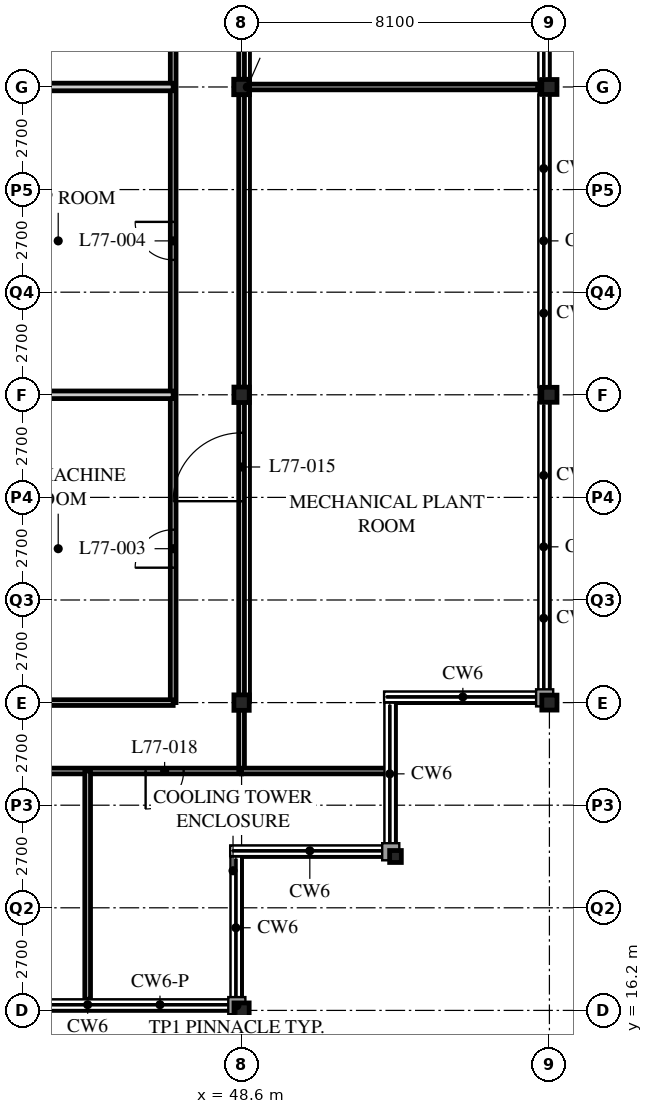
"""IFC4 building model, lengths in metres.
Left out: names, types, materials, properties, quantities, classifications, styles, units other than length and angle.
Written with IfcOpenShell. Run it as: python <this file> out.ifc"""

import sys

from ifc_helpers import new_model, si_unit, direction, frame, frame_2d, origin, origin_2d, place, context, subcontext, project, spatial, rectangle, hollow_rectangle, i_section, extrude, element, fill, save


model = new_model("IFC4")
c1 = context("Model", 3, precision=1e-05, world=origin(), true_north=direction((0.0, 1.0)))
c2 = subcontext(c1, "Body", "Model", "MODEL_VIEW")
j1 = project(units=[si_unit("LENGTHUNIT", "METRE"), si_unit("PLANEANGLEUNIT", "RADIAN")], contexts=[c1])
p1 = place(None, origin())
s1 = spatial("IfcSite", under=j1, at=p1, CompositionType="ELEMENT")
p2 = place(p1, origin())
s2 = spatial("IfcBuilding", under=s1, at=p2, CompositionType="ELEMENT")
p3 = place(p2, frame((0.0, 0.0, 303.9)))
s3 = spatial("IfcBuildingStorey", under=s2, at=p3, CompositionType="ELEMENT", Elevation=303.9)
p4 = place(p3, frame((48.6, 16.2, 0.0), z_axis=(0.0, 0.0, 1.0), x_axis=(1.0, 0.0, 0.0)))
e1 = element("IfcColumn", 1, at=p4, inside=s3, PredefinedType="COLUMN", context=c2, shape_type="SweptSolid", body=[
    extrude(i_section(OverallWidth=0.399, OverallDepth=0.394, WebThickness=0.023, FlangeThickness=0.037, FilletRadius=0.015, at=origin_2d()), origin(), (0.0, 0.0, 1.0), 6.0),
])
for number, where, z_axis, x_axis in (
    (2, (48.6, 24.3, 0.0), (0.0, 0.0, 1.0), (1.0, 0.0, 0.0)),
    (3, (48.6, 32.4, 0.0), (0.0, 0.0, 1.0), (1.0, 0.0, 0.0)),
    (4, (48.6, 40.5, 0.0), (0.0, 0.0, 1.0), (1.0, 0.0, 0.0)),
):
    element("IfcColumn", number, at=place(p3, frame(where, z_axis=z_axis, x_axis=x_axis)), inside=s3, PredefinedType="COLUMN", context=c2, shape_type="SweptSolid", body=[
        extrude(i_section(OverallWidth=0.403, OverallDepth=0.406, WebThickness=0.027, FlangeThickness=0.043, FilletRadius=0.015, at=origin_2d()), origin(), (0.0, 0.0, 1.0), 6.0),
    ])
p5 = place(p3, frame((52.65, 20.25, 0.0), z_axis=(0.0, 0.0, 1.0), x_axis=(1.0, 0.0, 0.0)))
e5 = element("IfcColumn", 5, at=p5, inside=s3, PredefinedType="COLUMN", context=c2, shape_type="SweptSolid", body=[
    extrude(i_section(OverallWidth=0.307, OverallDepth=0.314, WebThickness=0.012, FlangeThickness=0.019, FilletRadius=0.015, at=origin_2d()), origin(), (0.0, 0.0, 1.0), 6.0),
])
for number, where, z_axis, x_axis in (
    (6, (56.7, 24.3, 0.0), (0.0, 0.0, 1.0), (1.0, 0.0, 0.0)),
    (7, (56.7, 32.4, 0.0), (0.0, 0.0, 1.0), (1.0, 0.0, 0.0)),
    (8, (56.7, 40.5, 0.0), (0.0, 0.0, 1.0), (1.0, 0.0, 0.0)),
):
    element("IfcColumn", number, at=place(p3, frame(where, z_axis=z_axis, x_axis=x_axis)), inside=s3, PredefinedType="COLUMN", context=c2, shape_type="SweptSolid", body=[
        extrude(i_section(OverallWidth=0.399, OverallDepth=0.394, WebThickness=0.023, FlangeThickness=0.037, FilletRadius=0.015, at=origin_2d()), origin(), (0.0, 0.0, 1.0), 6.0),
    ])
p6 = place(p3, frame((8.35, 16.325, 6.0), z_axis=(0.0, 0.0, 1.0), x_axis=(1.0, 0.0, 0.0)))
e9 = element("IfcWall", 9, at=p6, inside=s3, PredefinedType="PARAPET", context=c2, shape_type="SweptSolid", body=[
    extrude(rectangle(XDim=40.25, YDim=0.25, at=frame_2d((20.125, 0.0))), origin(), (0.0, 0.0, 1.0), 1.285),
])
p7 = place(p3, frame((48.475, 16.45, 6.0), z_axis=(0.0, 0.0, 1.0), x_axis=(0.0, 1.0, 0.0)))
e10 = element("IfcWall", 10, at=p7, inside=s3, PredefinedType="PARAPET", context=c2, shape_type="SweptSolid", body=[
    extrude(rectangle(XDim=3.8, YDim=0.25, at=frame_2d((1.9, 0.0))), origin(), (0.0, 0.0, 1.0), 1.285),
])
p8 = place(p3, frame((48.35, 20.375, 6.0), z_axis=(0.0, 0.0, 1.0), x_axis=(1.0, 0.0, 0.0)))
e11 = element("IfcWall", 11, at=p8, inside=s3, PredefinedType="PARAPET", context=c2, shape_type="SweptSolid", body=[
    extrude(rectangle(XDim=4.3, YDim=0.25, at=frame_2d((2.15, 0.0))), origin(), (0.0, 0.0, 1.0), 1.285),
])
p9 = place(p3, frame((52.525, 20.5, 6.0), z_axis=(0.0, 0.0, 1.0), x_axis=(0.0, 1.0, 0.0)))
e12 = element("IfcWall", 12, at=p9, inside=s3, PredefinedType="PARAPET", context=c2, shape_type="SweptSolid", body=[
    extrude(rectangle(XDim=3.8, YDim=0.25, at=frame_2d((1.9, 0.0))), origin(), (0.0, 0.0, 1.0), 1.285),
])
p10 = place(p3, frame((52.4, 24.425, 6.0), z_axis=(0.0, 0.0, 1.0), x_axis=(1.0, 0.0, 0.0)))
e13 = element("IfcWall", 13, at=p10, inside=s3, PredefinedType="PARAPET", context=c2, shape_type="SweptSolid", body=[
    extrude(rectangle(XDim=4.3, YDim=0.25, at=frame_2d((2.15, 0.0))), origin(), (0.0, 0.0, 1.0), 1.285),
])
p11 = place(p3, frame((56.575, 24.55, 6.0), z_axis=(0.0, 0.0, 1.0), x_axis=(0.0, 1.0, 0.0)))
e14 = element("IfcWall", 14, at=p11, inside=s3, PredefinedType="PARAPET", context=c2, shape_type="SweptSolid", body=[
    extrude(rectangle(XDim=32.15, YDim=0.25, at=frame_2d((16.075, 0.0))), origin(), (0.0, 0.0, 1.0), 1.285),
])
p12 = place(p3, frame((48.6, 40.5, 6.0), z_axis=(0.0, 0.0, 1.0), x_axis=(1.0, 0.0, 0.0)))
e15 = element("IfcColumn", 15, at=p12, inside=s3, PredefinedType="COLUMN", context=c2, shape_type="SweptSolid", body=[
    extrude(hollow_rectangle(XDim=0.4, YDim=0.4, WallThickness=0.016, at=origin_2d()), origin(), (0.0, 0.0, 1.0), 13.896),
])
p13 = place(p3, frame((8.1, 22.5, 0.0), z_axis=(0.0, 0.0, 1.0), x_axis=(1.0, 0.0, 0.0)))
e16 = element("IfcWall", 16, at=p13, inside=s3, PredefinedType="PARTITIONING", context=c2, shape_type="SweptSolid", body=[
    extrude(rectangle(XDim=40.5, YDim=0.15, at=frame_2d((20.25, 0.0))), origin(), (0.0, 0.0, 1.0), 5.8),
])
p14 = place(p13, frame((11.25, 0.0, 0.0)))
e17 = element("IfcOpeningElement", 17, at=p14, cuts=e16, PredefinedType="OPENING", context=c2, shape_type="SweptSolid", body=[
    extrude(rectangle(XDim=1.8, YDim=2.4, at=frame_2d((0.9, 1.2))), frame((0.0, 0.085, 0.0), z_axis=(0.0, -1.0, 0.0), x_axis=(1.0, 0.0, 0.0)), (0.0, 0.0, 1.0), 0.17),
])
p15 = place(p13, frame((27.45, 0.0, 0.0)))
e18 = element("IfcOpeningElement", 18, at=p15, cuts=e16, PredefinedType="OPENING", context=c2, shape_type="SweptSolid", body=[
    extrude(rectangle(XDim=1.8, YDim=2.4, at=frame_2d((0.9, 1.2))), frame((0.0, 0.085, 0.0), z_axis=(0.0, -1.0, 0.0), x_axis=(1.0, 0.0, 0.0)), (0.0, 0.0, 1.0), 0.17),
])
p16 = place(p13, frame((1.525, 0.0, 0.0)))
e19 = element("IfcOpeningElement", 19, at=p16, cuts=e16, PredefinedType="OPENING", context=c2, shape_type="SweptSolid", body=[
    extrude(rectangle(XDim=1.0, YDim=2.1, at=frame_2d((0.5, 1.05))), frame((0.0, 0.085, 0.0), z_axis=(0.0, -1.0, 0.0), x_axis=(1.0, 0.0, 0.0)), (0.0, 0.0, 1.0), 0.17),
])
p17 = place(p13, frame((37.975, 0.0, 0.0)))
e20 = element("IfcOpeningElement", 20, at=p17, cuts=e16, PredefinedType="OPENING", context=c2, shape_type="SweptSolid", body=[
    extrude(rectangle(XDim=1.0, YDim=2.1, at=frame_2d((0.5, 1.05))), frame((0.0, 0.085, 0.0), z_axis=(0.0, -1.0, 0.0), x_axis=(1.0, 0.0, 0.0)), (0.0, 0.0, 1.0), 0.17),
])
p18 = place(p3, frame((48.6, 22.5, 0.0), z_axis=(0.0, 0.0, 1.0), x_axis=(0.0, 1.0, 0.0)))
e21 = element("IfcWall", 21, at=p18, inside=s3, PredefinedType="PARTITIONING", context=c2, shape_type="SweptSolid", body=[
    extrude(rectangle(XDim=34.2, YDim=0.15, at=frame_2d((17.1, 0.0))), origin(), (0.0, 0.0, 1.0), 5.038),
])
p19 = place(p18, frame((7.1, 0.0, 0.0)))
e22 = element("IfcOpeningElement", 22, at=p19, cuts=e21, PredefinedType="OPENING", context=c2, shape_type="SweptSolid", body=[
    extrude(rectangle(XDim=1.8, YDim=2.4, at=frame_2d((0.9, 1.2))), frame((0.0, 0.085, 0.0), z_axis=(0.0, -1.0, 0.0), x_axis=(1.0, 0.0, 0.0)), (0.0, 0.0, 1.0), 0.17),
])
p20 = place(p18, frame((26.95, 0.0, 0.0)))
e23 = element("IfcOpeningElement", 23, at=p20, cuts=e21, PredefinedType="OPENING", context=c2, shape_type="SweptSolid", body=[
    extrude(rectangle(XDim=1.8, YDim=2.4, at=frame_2d((0.9, 1.2))), frame((0.0, 0.085, 0.0), z_axis=(0.0, -1.0, 0.0), x_axis=(1.0, 0.0, 0.0)), (0.0, 0.0, 1.0), 0.17),
])
p21 = place(p3, frame((46.8, 24.3, 0.0), z_axis=(0.0, 0.0, 1.0), x_axis=(0.0, 1.0, 0.0)))
e24 = element("IfcWall", 24, at=p21, inside=s3, PredefinedType="PARTITIONING", context=c2, shape_type="SweptSolid", body=[
    extrude(rectangle(XDim=30.6, YDim=0.15, at=frame_2d((15.3, 0.0))), origin(), (0.0, 0.0, 1.0), 5.8),
])
p22 = place(p21, frame((3.55, 0.0, 0.0)))
e25 = element("IfcOpeningElement", 25, at=p22, cuts=e24, PredefinedType="OPENING", context=c2, shape_type="SweptSolid", body=[
    extrude(rectangle(XDim=1.0, YDim=2.1, at=frame_2d((0.5, 1.05))), frame((0.0, 0.085, 0.0), z_axis=(0.0, -1.0, 0.0), x_axis=(1.0, 0.0, 0.0)), (0.0, 0.0, 1.0), 0.17),
])
p23 = place(p21, frame((11.65, 0.0, 0.0)))
e26 = element("IfcOpeningElement", 26, at=p23, cuts=e24, PredefinedType="OPENING", context=c2, shape_type="SweptSolid", body=[
    extrude(rectangle(XDim=1.0, YDim=2.1, at=frame_2d((0.5, 1.05))), frame((0.0, 0.085, 0.0), z_axis=(0.0, -1.0, 0.0), x_axis=(1.0, 0.0, 0.0)), (0.0, 0.0, 1.0), 0.17),
])
p24 = place(p3, frame((40.7, 24.3, 0.0), z_axis=(0.0, 0.0, 1.0), x_axis=(1.0, 0.0, 0.0)))
e27 = element("IfcWall", 27, at=p24, inside=s3, PredefinedType="PARTITIONING", context=c2, shape_type="SweptSolid", body=[
    extrude(rectangle(XDim=6.1, YDim=0.15, at=frame_2d((3.05, 0.0))), origin(), (0.0, 0.0, 1.0), 5.038),
])
for number, where, z_axis, x_axis in (
    (28, (40.5, 32.4, 0.0), (0.0, 0.0, 1.0), (1.0, 0.0, 0.0)),
    (29, (40.5, 40.5, 0.0), (0.0, 0.0, 1.0), (1.0, 0.0, 0.0)),
):
    element("IfcWall", number, at=place(p3, frame(where, z_axis=z_axis, x_axis=x_axis)), inside=s3, PredefinedType="SOLIDWALL", context=c2, shape_type="SweptSolid", body=[
        extrude(rectangle(XDim=6.3, YDim=0.2, at=frame_2d((3.15, 0.0))), origin(), (0.0, 0.0, 1.0), 5.038),
    ])
p25 = place(p3, frame((48.6, 40.5, 0.0), z_axis=(0.0, 0.0, 1.0), x_axis=(1.0, 0.0, 0.0)))
e30 = element("IfcWall", 30, at=p25, inside=s3, PredefinedType="PARTITIONING", context=c2, shape_type="SweptSolid", body=[
    extrude(rectangle(XDim=7.8, YDim=0.15, at=frame_2d((3.9, 0.0))), origin(), (0.0, 0.0, 1.0), 5.038),
])
p26 = place(p3, frame((48.6, 22.5, 0.0), z_axis=(0.0, 0.0, 1.0), x_axis=(1.0, 0.0, 0.0)))
e31 = element("IfcWall", 31, at=p26, inside=s3, PredefinedType="PARTITIONING", context=c2, shape_type="SweptSolid", body=[
    extrude(rectangle(XDim=3.877, YDim=0.15, at=frame_2d((1.938, 0.0))), origin(), (0.0, 0.0, 1.0), 5.8),
])
p27 = place(p3, frame((44.55, 22.5, 0.0), z_axis=(0.0, 0.0, 1.0), x_axis=(0.0, -1.0, 0.0)))
e32 = element("IfcWall", 32, at=p27, inside=s3, PredefinedType="PARTITIONING", context=c2, shape_type="SweptSolid", body=[
    extrude(rectangle(XDim=6.007, YDim=0.15, at=frame_2d((3.003, 0.0))), origin(), (0.0, 0.0, 1.0), 5.8),
])
p28 = place(p22, origin())
e33 = element("IfcDoor", 33, at=p28, inside=s3, OperationType="SINGLE_SWING_LEFT", PredefinedType="DOOR", context=c2, shape_type="SweptSolid", body=[
    extrude(rectangle(XDim=1.0, YDim=2.1, at=frame_2d((0.5, 1.05))), frame((0.0, 0.025, 0.0), z_axis=(0.0, -1.0, 0.0), x_axis=(1.0, 0.0, 0.0)), (0.0, 0.0, 1.0), 0.05),
])
fill(e25, e33)
p29 = place(p23, origin())
e34 = element("IfcDoor", 34, at=p29, inside=s3, OperationType="SINGLE_SWING_RIGHT", PredefinedType="DOOR", context=c2, shape_type="SweptSolid", body=[
    extrude(rectangle(XDim=1.0, YDim=2.1, at=frame_2d((0.5, 1.05))), frame((0.0, 0.025, 0.0), z_axis=(0.0, -1.0, 0.0), x_axis=(1.0, 0.0, 0.0)), (0.0, 0.0, 1.0), 0.05),
])
fill(e26, e34)
p30 = place(p19, origin())
e35 = element("IfcDoor", 35, at=p30, inside=s3, OperationType="DOUBLE_DOOR_SINGLE_SWING", PredefinedType="DOOR", context=c2, shape_type="SweptSolid", body=[
    extrude(rectangle(XDim=1.8, YDim=2.4, at=frame_2d((0.9, 1.2))), frame((0.0, 0.025, 0.0), z_axis=(0.0, -1.0, 0.0), x_axis=(1.0, 0.0, 0.0)), (0.0, 0.0, 1.0), 0.05),
])
fill(e22, e35)
p31 = place(p17, origin())
e36 = element("IfcDoor", 36, at=p31, inside=s3, OperationType="SINGLE_SWING_RIGHT", PredefinedType="DOOR", context=c2, shape_type="SweptSolid", body=[
    extrude(rectangle(XDim=1.0, YDim=2.1, at=frame_2d((0.5, 1.05))), frame((0.0, 0.025, 0.0), z_axis=(0.0, -1.0, 0.0), x_axis=(1.0, 0.0, 0.0)), (0.0, 0.0, 1.0), 0.05),
])
fill(e20, e36)
save(model, sys.argv[1])
